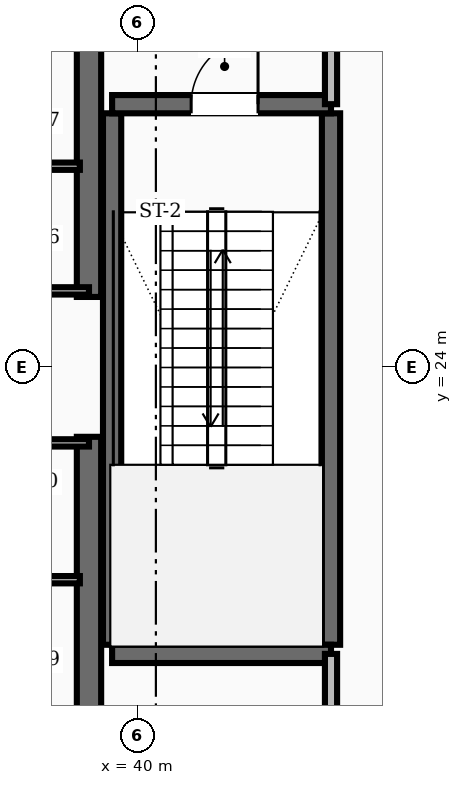
"""IFC4 building model, lengths in metres.
Left out: names, types, materials, properties, quantities, classifications, styles, units other than length and angle.
Written with IfcOpenShell. Run it as: python <this file> out.ifc"""

import sys

from ifc_helpers import new_model, si_unit, direction, frame, frame_2d, origin, place, context, subcontext, project, spatial, rectangle, extrude, element, fill, save


model = new_model("IFC4")
c1 = context("Model", 3, precision=1e-05, world=origin(), true_north=direction((0.0, 1.0)))
c2 = subcontext(c1, "Body", "Model", "MODEL_VIEW")
j1 = project(units=[si_unit("LENGTHUNIT", "METRE"), si_unit("PLANEANGLEUNIT", "RADIAN")], contexts=[c1])
p1 = place(None, origin())
s1 = spatial("IfcSite", under=j1, at=p1, CompositionType="ELEMENT")
p2 = place(p1, origin())
s2 = spatial("IfcBuilding", under=s1, at=p2, CompositionType="ELEMENT")
p3 = place(p2, frame((0.0, 0.0, 14.8)))
s3 = spatial("IfcBuildingStorey", under=s2, at=p3, CompositionType="ELEMENT", Elevation=14.8)
for number, where, z_axis, x_axis in (
    (1, (39.2, 16.55, 0.0), (0.0, 0.0, 1.0), (0.0, 1.0, 0.0)),
    (2, (39.2, 25.15, 0.0), (0.0, 0.0, 1.0), (0.0, 1.0, 0.0)),
):
    element("IfcWall", number, at=place(p3, frame(where, z_axis=z_axis, x_axis=x_axis)), inside=s3, PredefinedType="SHEAR", context=c2, shape_type="SweptSolid", body=[
        extrude(rectangle(XDim=6.3, YDim=0.4, at=frame_2d((3.15, 0.0))), origin(), (0.0, 0.0, 1.0), 4.8),
    ])
for number, where, z_axis, x_axis in (
    (3, (43.18, 19.43, 0.0), (0.0, 0.0, 1.0), (0.0, 1.0, 0.0)),
    (4, (39.58, 19.43, 0.0), (0.0, 0.0, 1.0), (0.0, 1.0, 0.0)),
):
    element("IfcWall", number, at=place(p3, frame(where, z_axis=z_axis, x_axis=x_axis)), inside=s3, PredefinedType="SHEAR", context=c2, shape_type="SweptSolid", body=[
        extrude(rectangle(XDim=8.74, YDim=0.3, at=frame_2d((4.37, 0.0))), origin(), (0.0, 0.0, 1.0), 4.8),
    ])
p4 = place(p3, frame((39.58, 19.28, 0.0), z_axis=(0.0, 0.0, 1.0), x_axis=(1.0, 0.0, 0.0)))
e5 = element("IfcWall", 5, at=p4, inside=s3, PredefinedType="SHEAR", context=c2, shape_type="SweptSolid", body=[
    extrude(rectangle(XDim=3.6, YDim=0.3, at=frame_2d((1.8, 0.0))), origin(), (0.0, 0.0, 1.0), 4.8),
])
p5 = place(p3, frame((39.58, 28.32, 0.0), z_axis=(0.0, 0.0, 1.0), x_axis=(1.0, 0.0, 0.0)))
e6 = element("IfcWall", 6, at=p5, inside=s3, PredefinedType="SHEAR", context=c2, shape_type="SweptSolid", body=[
    extrude(rectangle(XDim=3.6, YDim=0.3, at=frame_2d((1.8, 0.0))), origin(), (0.0, 0.0, 1.0), 4.8),
])
p6 = place(p5, frame((1.3, 0.0, 0.0)))
e7 = element("IfcOpeningElement", 7, at=p6, cuts=e6, PredefinedType="OPENING", context=c2, shape_type="SweptSolid", body=[
    extrude(rectangle(XDim=1.1, YDim=2.1, at=frame_2d((0.55, 1.05))), frame((0.0, 0.16, 0.0), z_axis=(0.0, -1.0, 0.0), x_axis=(1.0, 0.0, 0.0)), (0.0, 0.0, 1.0), 0.32),
])
p7 = place(p3, frame((43.18, 28.32, 0.0), z_axis=(0.0, 0.0, 1.0), x_axis=(0.0, 1.0, 0.0)))
e8 = element("IfcWall", 8, at=p7, inside=s3, PredefinedType="SOLIDWALL", context=c2, shape_type="SweptSolid", body=[
    extrude(rectangle(XDim=3.13, YDim=0.2, at=frame_2d((1.565, 0.0))), origin(), (0.0, 0.0, 1.0), 3.52),
])
p8 = place(p7, frame((1.015, 0.0, 0.0)))
e9 = element("IfcOpeningElement", 9, at=p8, cuts=e8, PredefinedType="OPENING", context=c2, shape_type="SweptSolid", body=[
    extrude(rectangle(XDim=1.1, YDim=2.1, at=frame_2d((0.55, 1.05))), frame((0.0, 0.11, 0.0), z_axis=(0.0, -1.0, 0.0), x_axis=(1.0, 0.0, 0.0)), (0.0, 0.0, 1.0), 0.22),
])
p9 = place(p3, frame((43.18, 16.55, 0.0), z_axis=(0.0, 0.0, 1.0), x_axis=(0.0, 1.0, 0.0)))
e10 = element("IfcWall", 10, at=p9, inside=s3, PredefinedType="SOLIDWALL", context=c2, shape_type="SweptSolid", body=[
    extrude(rectangle(XDim=2.73, YDim=0.2, at=frame_2d((1.365, 0.0))), origin(), (0.0, 0.0, 1.0), 3.52),
])
p10 = place(p9, frame((0.89, 0.0, 0.0)))
e11 = element("IfcOpeningElement", 11, at=p10, cuts=e10, PredefinedType="OPENING", context=c2, shape_type="SweptSolid", body=[
    extrude(rectangle(XDim=0.95, YDim=2.1, at=frame_2d((0.475, 1.05))), frame((0.0, 0.11, 0.0), z_axis=(0.0, -1.0, 0.0), x_axis=(1.0, 0.0, 0.0)), (0.0, 0.0, 1.0), 0.22),
])
for number, where, z_axis, x_axis in (
    (12, (37.4, 25.25, 0.0), (0.0, 0.0, 1.0), (1.0, 0.0, 0.0)),
    (13, (37.4, 22.75, 0.0), (0.0, 0.0, 1.0), (1.0, 0.0, 0.0)),
):
    element("IfcWall", number, at=place(p3, frame(where, z_axis=z_axis, x_axis=x_axis)), inside=s3, PredefinedType="PARTITIONING", context=c2, shape_type="SweptSolid", body=[
        extrude(rectangle(XDim=1.8, YDim=0.12, at=frame_2d((0.9, 0.0))), origin(), (0.0, 0.0, 1.0), 3.52),
    ])
for number, where, z_axis, x_axis in (
    (14, (37.4, 27.3, 0.0), (0.0, 0.0, 1.0), (1.0, 0.0, 0.0)),
    (15, (37.4, 20.5, 0.0), (0.0, 0.0, 1.0), (1.0, 0.0, 0.0)),
):
    element("IfcWall", number, at=place(p3, frame(where, z_axis=z_axis, x_axis=x_axis)), inside=s3, PredefinedType="PARTITIONING", context=c2, shape_type="SweptSolid", body=[
        extrude(rectangle(XDim=1.65, YDim=0.12, at=frame_2d((0.825, 0.0))), origin(), (0.0, 0.0, 1.0), 3.52),
    ])
p11 = place(p6, origin())
e16 = element("IfcDoor", 16, at=p11, inside=s3, OperationType="SINGLE_SWING_RIGHT", PredefinedType="DOOR", context=c2, shape_type="SweptSolid", body=[
    extrude(rectangle(XDim=1.1, YDim=2.1, at=frame_2d((0.55, 1.05))), frame((0.0, 0.025, 0.0), z_axis=(0.0, -1.0, 0.0), x_axis=(1.0, 0.0, 0.0)), (0.0, 0.0, 1.0), 0.05),
])
fill(e7, e16)
save(model, sys.argv[1])
